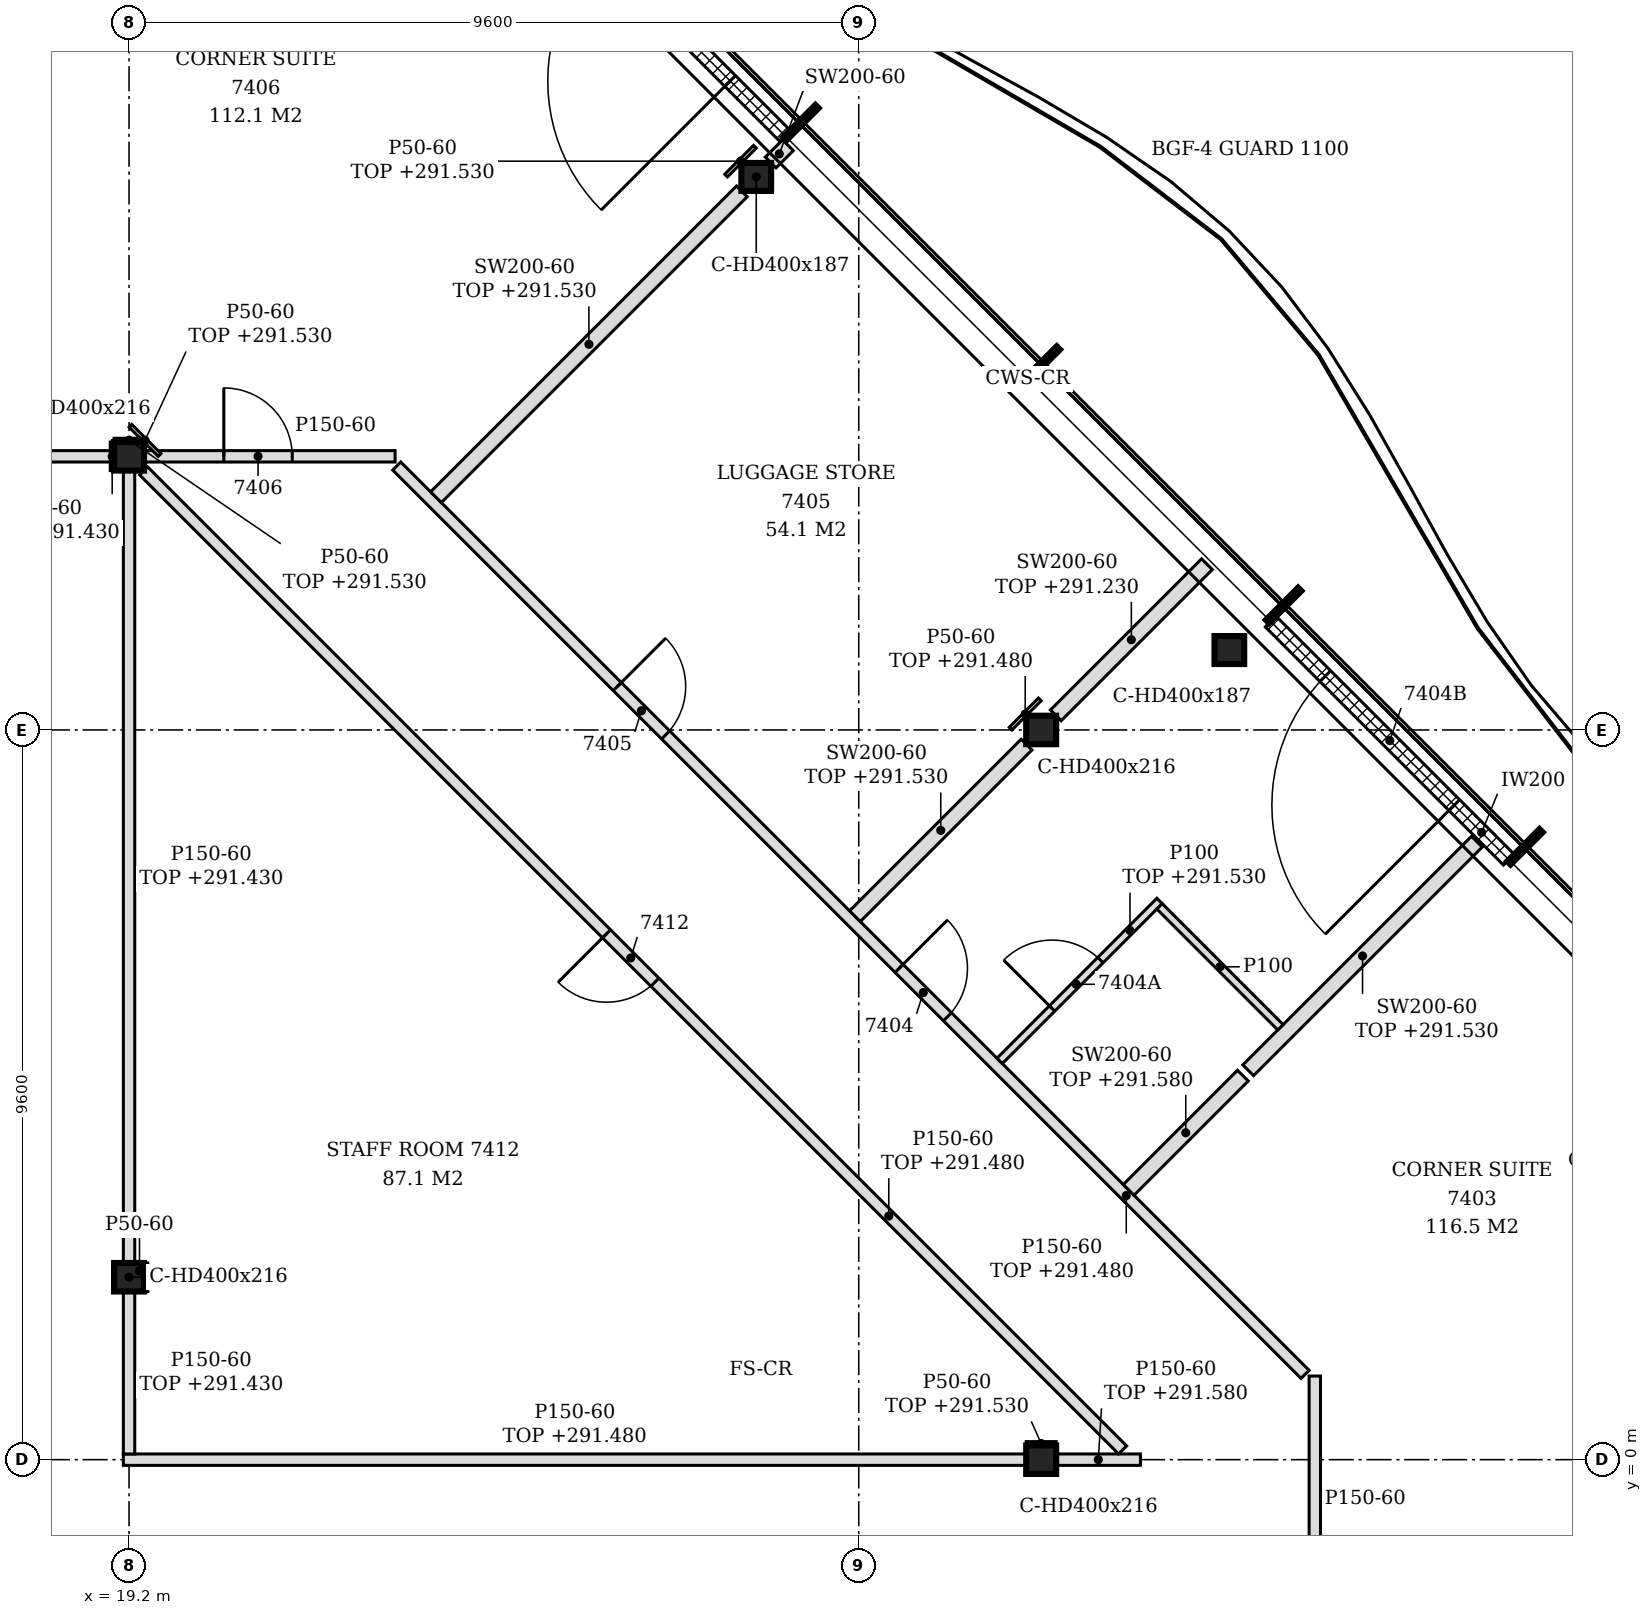
"""IFC4 building model, lengths in metres.
Left out: names, types, materials, properties, quantities, classifications, styles, units other than length and angle.
Written with IfcOpenShell. Run it as: python <this file> out.ifc"""

import sys

from ifc_helpers import new_model, si_unit, direction, frame, frame_2d, origin, origin_2d, place, context, subcontext, project, spatial, polyline, rectangle, i_section, outline, extrude, element, fill, save


model = new_model("IFC4")
c1 = context("Model", 3, precision=1e-05, world=origin(), true_north=direction((0.0, 1.0)))
c2 = subcontext(c1, "Body", "Model", "MODEL_VIEW")
j1 = project(units=[si_unit("LENGTHUNIT", "METRE"), si_unit("PLANEANGLEUNIT", "RADIAN")], contexts=[c1])
p1 = place(None, origin())
s1 = spatial("IfcSite", under=j1, at=p1, CompositionType="ELEMENT")
p2 = place(p1, origin())
s2 = spatial("IfcBuilding", under=s1, at=p2, CompositionType="ELEMENT")
p3 = place(p2, frame((0.0, 0.0, 288.6)))
s3 = spatial("IfcBuildingStorey", under=s2, at=p3, CompositionType="ELEMENT", Elevation=288.6)
for number, where, z_axis, x_axis in (
    (1, (33.676, 10.652, -0.15), (0.0, 0.0, 1.0), (1.0, 0.0, 0.0)),
    (2, (27.451, 16.876, -0.15), (0.0, 0.0, 1.0), (1.0, 0.0, 0.0)),
):
    element("IfcColumn", number, at=place(p3, frame(where, z_axis=z_axis, x_axis=x_axis)), inside=s3, PredefinedType="COLUMN", context=c2, shape_type="SweptSolid", body=[
        extrude(i_section(OverallWidth=0.391, OverallDepth=0.368, WebThickness=0.015, FlangeThickness=0.024, FilletRadius=0.015, at=origin_2d()), origin(), (0.0, 0.0, 1.0), 3.6),
    ])
for number, where, z_axis, x_axis in (
    (3, (19.2, 2.4, -0.15), (0.0, 0.0, 1.0), (1.0, 0.0, 0.0)),
    (4, (19.2, 13.2, -0.15), (0.0, 0.0, 1.0), (1.0, 0.0, 0.0)),
    (5, (31.2, 0.0, -0.15), (0.0, 0.0, 1.0), (1.0, 0.0, 0.0)),
    (6, (31.2, 9.6, -0.15), (0.0, 0.0, 1.0), (1.0, 0.0, 0.0)),
):
    element("IfcColumn", number, at=place(p3, frame(where, z_axis=z_axis, x_axis=x_axis)), inside=s3, PredefinedType="COLUMN", context=c2, shape_type="SweptSolid", body=[
        extrude(i_section(OverallWidth=0.394, OverallDepth=0.375, WebThickness=0.017, FlangeThickness=0.028, FilletRadius=0.015, at=origin_2d()), origin(), (0.0, 0.0, 1.0), 3.6),
    ])
p4 = place(p3, frame((37.353, 7.893, 0.0), z_axis=(0.0, 0.0, 1.0), x_axis=(-0.707134329907, 0.707079231393, 0.0)))
e7 = element("IfcWall", 7, at=p4, inside=s3, PredefinedType="NOTDEFINED", context=c2, shape_type="SweptSolid", body=[
    extrude(rectangle(XDim=4.431, YDim=0.2, at=frame_2d((2.215, 0.0))), origin(), (0.0, 0.0, 1.0), 3.45),
])
p5 = place(p4, frame((1.016, 0.0, 0.0)))
e8 = element("IfcOpeningElement", 8, at=p5, cuts=e7, PredefinedType="OPENING", context=c2, shape_type="SweptSolid", body=[
    extrude(rectangle(XDim=2.4, YDim=2.4, at=frame_2d((1.2, 1.2))), frame((0.0, 0.11, 0.0), z_axis=(0.0, -1.0, 0.0), x_axis=(1.0, 0.0, 0.0)), (0.0, 0.0, 1.0), 0.22),
])
p6 = place(p3, frame((27.826, 17.42, 0.0), z_axis=(0.0, 0.0, 1.0), x_axis=(-0.707079231393, 0.707134329907, 0.0)))
e9 = element("IfcWall", 9, at=p6, inside=s3, PredefinedType="NOTDEFINED", context=c2, shape_type="SweptSolid", body=[
    extrude(rectangle(XDim=4.431, YDim=0.2, at=frame_2d((2.215, 0.0))), origin(), (0.0, 0.0, 1.0), 3.45),
])
p7 = place(p6, frame((1.015, 0.0, 0.0)))
e10 = element("IfcOpeningElement", 10, at=p7, cuts=e9, PredefinedType="OPENING", context=c2, shape_type="SweptSolid", body=[
    extrude(rectangle(XDim=2.4, YDim=2.4, at=frame_2d((1.2, 1.2))), frame((0.0, 0.11, 0.0), z_axis=(0.0, -1.0, 0.0), x_axis=(1.0, 0.0, 0.0)), (0.0, 0.0, 1.0), 0.22),
])
p8 = place(p3, frame((34.8, -2.134, 0.0), z_axis=(0.0, 0.0, 1.0), x_axis=(0.0, 1.0, 0.0)))
e11 = element("IfcWall", 11, at=p8, inside=s3, PredefinedType="PARTITIONING", context=c2, shape_type="SweptSolid", body=[
    extrude(outline(polyline([(0.0, 0.0), (3.234, 0.0), (3.234, 3.45), (2.229, 3.45), (2.227, 2.98), (2.039, 2.98), (2.037, 3.45), (0.0, 3.45), (0.0, 0.0)])), frame((0.0, 0.075, 0.0), z_axis=(0.0, -1.0, 0.0), x_axis=(1.0, 0.0, 0.0)), (0.0, 0.0, 1.0), 0.15),
])
p9 = place(p3, frame((19.125, 0.0, 0.0), z_axis=(0.0, 0.0, 1.0), x_axis=(1.0, 0.0, 0.0)))
e12 = element("IfcWall", 12, at=p9, inside=s3, PredefinedType="PARTITIONING", context=c2, shape_type="SweptSolid", body=[
    extrude(outline(polyline([(0.0, 0.0), (11.878, 0.0), (11.878, 2.88), (0.225, 2.88), (0.223, 2.83), (0.0, 2.83), (0.0, 0.0)])), frame((0.0, 0.075, 0.0), z_axis=(0.0, -1.0, 0.0), x_axis=(1.0, 0.0, 0.0)), (0.0, 0.0, 1.0), 0.15),
])
p10 = place(p3, frame((31.397, 0.0, 0.0), z_axis=(0.0, 0.0, 1.0), x_axis=(1.0, 0.0, 0.0)))
e13 = element("IfcWall", 13, at=p10, inside=s3, PredefinedType="PARTITIONING", context=c2, shape_type="SweptSolid", body=[
    extrude(rectangle(XDim=1.109, YDim=0.15, at=frame_2d((0.555, 0.0))), origin(), (0.0, 0.0, 1.0), 2.98),
])
p11 = place(p3, frame((19.2, 0.075, 0.0), z_axis=(0.0, 0.0, 1.0), x_axis=(0.0, 1.0, 0.0)))
e14 = element("IfcWall", 14, at=p11, inside=s3, PredefinedType="PARTITIONING", context=c2, shape_type="SweptSolid", body=[
    extrude(rectangle(XDim=2.137, YDim=0.15, at=frame_2d((1.069, 0.0))), origin(), (0.0, 0.0, 1.0), 2.83),
])
p12 = place(p3, frame((32.272, 0.128, 0.0), z_axis=(0.0, 0.0, 1.0), x_axis=(-0.707106781187, 0.707106781187, 0.0)))
e15 = element("IfcWall", 15, at=p12, inside=s3, PredefinedType="PARTITIONING", context=c2, shape_type="SweptSolid", body=[
    extrude(rectangle(XDim=18.215, YDim=0.15, at=frame_2d((9.107, 0.0))), origin(), (0.0, 0.0, 1.0), 2.88),
])
p13 = place(p12, frame((8.703, 0.0, 0.0)))
e16 = element("IfcOpeningElement", 16, at=p13, cuts=e15, PredefinedType="OPENING", context=c2, shape_type="SweptSolid", body=[
    extrude(rectangle(XDim=0.9, YDim=2.1, at=frame_2d((0.45, 1.05))), frame((0.0, 0.085, 0.0), z_axis=(0.0, -1.0, 0.0), x_axis=(1.0, 0.0, 0.0)), (0.0, 0.0, 1.0), 0.17),
])
p14 = place(p3, frame((34.672, 1.122, 0.0), z_axis=(0.0, 0.0, 1.0), x_axis=(-0.707114004264, 0.707099558035, 0.0)))
e17 = element("IfcWall", 17, at=p14, inside=s3, PredefinedType="PARTITIONING", context=c2, shape_type="SweptSolid", body=[
    extrude(rectangle(XDim=16.9, YDim=0.15, at=frame_2d((8.45, 0.0))), origin(), (0.0, 0.0, 1.0), 2.88),
])
p15 = place(p14, frame((6.654, 0.0, 0.0)))
e18 = element("IfcOpeningElement", 18, at=p15, cuts=e17, PredefinedType="OPENING", context=c2, shape_type="SweptSolid", body=[
    extrude(rectangle(XDim=0.9, YDim=2.1, at=frame_2d((0.45, 1.05))), frame((0.0, 0.085, 0.0), z_axis=(0.0, -1.0, 0.0), x_axis=(1.0, 0.0, 0.0)), (0.0, 0.0, 1.0), 0.17),
])
p16 = place(p14, frame((11.897, 0.0, 0.0)))
e19 = element("IfcOpeningElement", 19, at=p16, cuts=e17, PredefinedType="OPENING", context=c2, shape_type="SweptSolid", body=[
    extrude(rectangle(XDim=0.9, YDim=2.1, at=frame_2d((0.45, 1.05))), frame((0.0, 0.085, 0.0), z_axis=(0.0, -1.0, 0.0), x_axis=(1.0, 0.0, 0.0)), (0.0, 0.0, 1.0), 0.17),
])
p17 = place(p3, frame((19.2, 2.587, 0.0), z_axis=(0.0, 0.0, 1.0), x_axis=(0.0, 1.0, 0.0)))
e20 = element("IfcWall", 20, at=p17, inside=s3, PredefinedType="PARTITIONING", context=c2, shape_type="SweptSolid", body=[
    extrude(rectangle(XDim=10.425, YDim=0.15, at=frame_2d((5.212, 0.0))), origin(), (0.0, 0.0, 1.0), 2.83),
])
p18 = place(p3, frame((32.351, 3.549, 0.0), z_axis=(0.0, 0.0, 1.0), x_axis=(0.706934449228, 0.707279071156, 0.0)))
e21 = element("IfcWall", 21, at=p18, inside=s3, PredefinedType="PARTITIONING", context=c2, shape_type="SweptSolid", body=[
    extrude(rectangle(XDim=2.125, YDim=0.2, at=frame_2d((1.062, 0.0))), origin(), (0.0, 0.0, 1.0), 2.98),
])
p19 = place(p3, frame((33.924, 5.123, 0.0), z_axis=(0.0, 0.0, 1.0), x_axis=(0.70722156193, 0.706991981809, 0.0)))
e22 = element("IfcWall", 22, at=p19, inside=s3, PredefinedType="PARTITIONING", context=c2, shape_type="SweptSolid", body=[
    extrude(rectangle(XDim=4.254, YDim=0.2, at=frame_2d((2.127, 0.0))), origin(), (0.0, 0.0, 1.0), 2.93),
])
p20 = place(p3, frame((30.654, 5.246, 0.0), z_axis=(0.0, 0.0, 1.0), x_axis=(0.706942643129, 0.707270881152, 0.0)))
e23 = element("IfcWall", 23, at=p20, inside=s3, PredefinedType="PARTITIONING", context=c2, shape_type="SweptSolid", body=[
    extrude(rectangle(XDim=2.975, YDim=0.1, at=frame_2d((1.488, 0.0))), origin(), (0.0, 0.0, 1.0), 2.93),
])
p21 = place(p20, frame((0.975, 0.0, 0.0)))
e24 = element("IfcOpeningElement", 24, at=p21, cuts=e23, PredefinedType="OPENING", context=c2, shape_type="SweptSolid", body=[
    extrude(rectangle(XDim=0.9, YDim=2.1, at=frame_2d((0.45, 1.05))), frame((0.0, 0.06, 0.0), z_axis=(0.0, -1.0, 0.0), x_axis=(1.0, 0.0, 0.0)), (0.0, 0.0, 1.0), 0.12),
])
p22 = place(p3, frame((34.348, 5.689, 0.0), z_axis=(0.0, 0.0, 1.0), x_axis=(-0.70716103421, 0.707052524, 0.0)))
e25 = element("IfcWall", 25, at=p22, inside=s3, PredefinedType="PARTITIONING", context=c2, shape_type="SweptSolid", body=[
    extrude(rectangle(XDim=2.25, YDim=0.1, at=frame_2d((1.125, 0.0))), origin(), (0.0, 0.0, 1.0), 3.45),
])
p23 = place(p3, frame((28.75, 7.15, 0.0), z_axis=(0.0, 0.0, 1.0), x_axis=(0.707106781187, 0.707106781187, 0.0)))
e26 = element("IfcWall", 26, at=p23, inside=s3, PredefinedType="PARTITIONING", context=c2, shape_type="SweptSolid", body=[
    extrude(rectangle(XDim=3.193, YDim=0.2, at=frame_2d((1.597, 0.0))), origin(), (0.0, 0.0, 1.0), 2.93),
])
p24 = place(p3, frame((31.392, 9.792, 0.0), z_axis=(0.0, 0.0, 1.0), x_axis=(0.707106781187, 0.707106781187, 0.0)))
e27 = element("IfcWall", 27, at=p24, inside=s3, PredefinedType="PARTITIONING", context=c2, shape_type="SweptSolid", body=[
    extrude(rectangle(XDim=2.812, YDim=0.2, at=frame_2d((1.406, 0.0))), origin(), (0.0, 0.0, 1.0), 2.63),
])
p25 = place(p3, frame((23.238, 12.662, 0.0), z_axis=(0.0, 0.0, 1.0), x_axis=(0.707106781187, 0.707106781187, 0.0)))
e28 = element("IfcWall", 28, at=p25, inside=s3, PredefinedType="PARTITIONING", context=c2, shape_type="SweptSolid", body=[
    extrude(rectangle(XDim=5.69, YDim=0.2, at=frame_2d((2.845, 0.0))), origin(), (0.0, 0.0, 1.0), 2.93),
])
p26 = place(p3, frame((7.397, 13.2, 0.0), z_axis=(0.0, 0.0, 1.0), x_axis=(1.0, 0.0, 0.0)))
e29 = element("IfcWall", 29, at=p26, inside=s3, PredefinedType="PARTITIONING", context=c2, shape_type="SweptSolid", body=[
    extrude(rectangle(XDim=11.606, YDim=0.15, at=frame_2d((5.803, 0.0))), origin(), (0.0, 0.0, 1.0), 2.83),
])
p27 = place(p3, frame((19.397, 13.2, 0.0), z_axis=(0.0, 0.0, 1.0), x_axis=(1.0, 0.0, 0.0)))
e30 = element("IfcWall", 30, at=p27, inside=s3, PredefinedType="PARTITIONING", context=c2, shape_type="SweptSolid", body=[
    extrude(rectangle(XDim=3.303, YDim=0.15, at=frame_2d((1.652, 0.0))), origin(), (0.0, 0.0, 1.0), 3.45),
])
p28 = place(p27, frame((1.05, 0.0, 0.0)))
e31 = element("IfcOpeningElement", 31, at=p28, cuts=e30, PredefinedType="OPENING", context=c2, shape_type="SweptSolid", body=[
    extrude(rectangle(XDim=0.9, YDim=2.1, at=frame_2d((0.45, 1.05))), frame((0.0, 0.085, 0.0), z_axis=(0.0, -1.0, 0.0), x_axis=(1.0, 0.0, 0.0)), (0.0, 0.0, 1.0), 0.17),
])
p29 = place(p3, frame((27.641, 17.065, 0.0), z_axis=(0.0, 0.0, 1.0), x_axis=(0.707106781187, 0.707106781187, 0.0)))
e32 = element("IfcWall", 32, at=p29, inside=s3, PredefinedType="PARTITIONING", context=c2, shape_type="SweptSolid", body=[
    extrude(rectangle(XDim=0.322, YDim=0.2, at=frame_2d((0.161, 0.0))), origin(), (0.0, 0.0, 1.0), 3.45),
])
p30 = place(p3, frame((31.003, 0.212, 0.0), z_axis=(0.0, 0.0, 1.0), x_axis=(1.0, 0.0, 0.0)))
e33 = element("IfcWall", 33, at=p30, inside=s3, PredefinedType="PARTITIONING", context=c2, shape_type="SweptSolid", body=[
    extrude(rectangle(XDim=0.394, YDim=0.05, at=frame_2d((0.197, 0.0))), origin(), (0.0, 0.0, 1.0), 2.93),
])
p31 = place(p3, frame((19.422, 2.212, 0.0), z_axis=(0.0, 0.0, 1.0), x_axis=(0.0, 1.0, 0.0)))
e34 = element("IfcWall", 34, at=p31, inside=s3, PredefinedType="PARTITIONING", context=c2, shape_type="SweptSolid", body=[
    extrude(rectangle(XDim=0.375, YDim=0.05, at=frame_2d((0.188, 0.0))), origin(), (0.0, 0.0, 1.0), 3.45),
])
p32 = place(p3, frame((18.978, 13.012, 0.0), z_axis=(0.0, 0.0, 1.0), x_axis=(0.0, 1.0, 0.0)))
e35 = element("IfcWall", 35, at=p32, inside=s3, PredefinedType="PARTITIONING", context=c2, shape_type="SweptSolid", body=[
    extrude(rectangle(XDim=0.375, YDim=0.05, at=frame_2d((0.188, 0.0))), origin(), (0.0, 0.0, 1.0), 2.83),
])
p33 = place(p3, frame((19.602, 13.218, 0.0), z_axis=(0.0, 0.0, 1.0), x_axis=(-0.707106781187, 0.707106781187, 0.0)))
e36 = element("IfcWall", 36, at=p33, inside=s3, PredefinedType="PARTITIONING", context=c2, shape_type="SweptSolid", body=[
    extrude(rectangle(XDim=0.544, YDim=0.05, at=frame_2d((0.272, 0.0))), origin(), (0.0, 0.0, 1.0), 2.93),
])
p34 = place(p3, frame((30.798, 9.618, 0.0), z_axis=(0.0, 0.0, 1.0), x_axis=(0.707106781187, 0.707106781187, 0.0)))
e37 = element("IfcWall", 37, at=p34, inside=s3, PredefinedType="PARTITIONING", context=c2, shape_type="SweptSolid", body=[
    extrude(rectangle(XDim=0.544, YDim=0.05, at=frame_2d((0.272, 0.0))), origin(), (0.0, 0.0, 1.0), 2.88),
])
p35 = place(p3, frame((27.054, 16.893, 0.0), z_axis=(0.0, 0.0, 1.0), x_axis=(0.707106781187, 0.707106781187, 0.0)))
e38 = element("IfcWall", 38, at=p35, inside=s3, PredefinedType="PARTITIONING", context=c2, shape_type="SweptSolid", body=[
    extrude(rectangle(XDim=0.537, YDim=0.05, at=frame_2d((0.269, 0.0))), origin(), (0.0, 0.0, 1.0), 2.93),
])
p36 = place(p3, frame((19.003, 13.413, 0.0), z_axis=(0.0, 0.0, 1.0), x_axis=(1.0, 0.0, 0.0)))
e39 = element("IfcWall", 39, at=p36, inside=s3, PredefinedType="PARTITIONING", context=c2, shape_type="SweptSolid", body=[
    extrude(rectangle(XDim=0.394, YDim=0.05, at=frame_2d((0.197, 0.0))), origin(), (0.0, 0.0, 1.0), 2.93),
])
p37 = place(p5, origin())
e40 = element("IfcDoor", 40, at=p37, inside=s3, OperationType="SINGLE_SWING_LEFT", PredefinedType="DOOR", context=c2, shape_type="SweptSolid", body=[
    extrude(rectangle(XDim=2.4, YDim=2.4, at=frame_2d((1.2, 1.2))), frame((0.0, 0.025, 0.0), z_axis=(0.0, -1.0, 0.0), x_axis=(1.0, 0.0, 0.0)), (0.0, 0.0, 1.0), 0.05),
])
fill(e8, e40)
p38 = place(p7, origin())
e41 = element("IfcDoor", 41, at=p38, inside=s3, OperationType="SINGLE_SWING_LEFT", PredefinedType="DOOR", context=c2, shape_type="SweptSolid", body=[
    extrude(rectangle(XDim=2.4, YDim=2.4, at=frame_2d((1.2, 1.2))), frame((0.0, 0.025, 0.0), z_axis=(0.0, -1.0, 0.0), x_axis=(1.0, 0.0, 0.0)), (0.0, 0.0, 1.0), 0.05),
])
fill(e10, e41)
p39 = place(p15, frame((0.9, 0.0, 0.0), z_axis=(0.0, 0.0, 1.0), x_axis=(-1.0, 0.0, 0.0)))
e42 = element("IfcDoor", 42, at=p39, inside=s3, OperationType="SINGLE_SWING_LEFT", PredefinedType="DOOR", context=c2, shape_type="SweptSolid", body=[
    extrude(rectangle(XDim=0.9, YDim=2.1, at=frame_2d((0.45, 1.05))), frame((0.0, 0.025, 0.0), z_axis=(0.0, -1.0, 0.0), x_axis=(1.0, 0.0, 0.0)), (0.0, 0.0, 1.0), 0.05),
])
fill(e18, e42)
p40 = place(p21, origin())
e43 = element("IfcDoor", 43, at=p40, inside=s3, OperationType="SINGLE_SWING_LEFT", PredefinedType="DOOR", context=c2, shape_type="SweptSolid", body=[
    extrude(rectangle(XDim=0.9, YDim=2.1, at=frame_2d((0.45, 1.05))), frame((0.0, 0.025, 0.0), z_axis=(0.0, -1.0, 0.0), x_axis=(1.0, 0.0, 0.0)), (0.0, 0.0, 1.0), 0.05),
])
fill(e24, e43)
p41 = place(p16, frame((0.9, 0.0, 0.0), z_axis=(0.0, 0.0, 1.0), x_axis=(-1.0, 0.0, 0.0)))
e44 = element("IfcDoor", 44, at=p41, inside=s3, OperationType="SINGLE_SWING_LEFT", PredefinedType="DOOR", context=c2, shape_type="SweptSolid", body=[
    extrude(rectangle(XDim=0.9, YDim=2.1, at=frame_2d((0.45, 1.05))), frame((0.0, 0.025, 0.0), z_axis=(0.0, -1.0, 0.0), x_axis=(1.0, 0.0, 0.0)), (0.0, 0.0, 1.0), 0.05),
])
fill(e19, e44)
p42 = place(p28, origin())
e45 = element("IfcDoor", 45, at=p42, inside=s3, OperationType="SINGLE_SWING_LEFT", PredefinedType="DOOR", context=c2, shape_type="SweptSolid", body=[
    extrude(rectangle(XDim=0.9, YDim=2.1, at=frame_2d((0.45, 1.05))), frame((0.0, 0.025, 0.0), z_axis=(0.0, -1.0, 0.0), x_axis=(1.0, 0.0, 0.0)), (0.0, 0.0, 1.0), 0.05),
])
fill(e31, e45)
p43 = place(p13, origin())
e46 = element("IfcDoor", 46, at=p43, inside=s3, OperationType="SINGLE_SWING_RIGHT", PredefinedType="DOOR", context=c2, shape_type="SweptSolid", body=[
    extrude(rectangle(XDim=0.9, YDim=2.1, at=frame_2d((0.45, 1.05))), frame((0.0, 0.025, 0.0), z_axis=(0.0, -1.0, 0.0), x_axis=(1.0, 0.0, 0.0)), (0.0, 0.0, 1.0), 0.05),
])
fill(e16, e46)
save(model, sys.argv[1])
